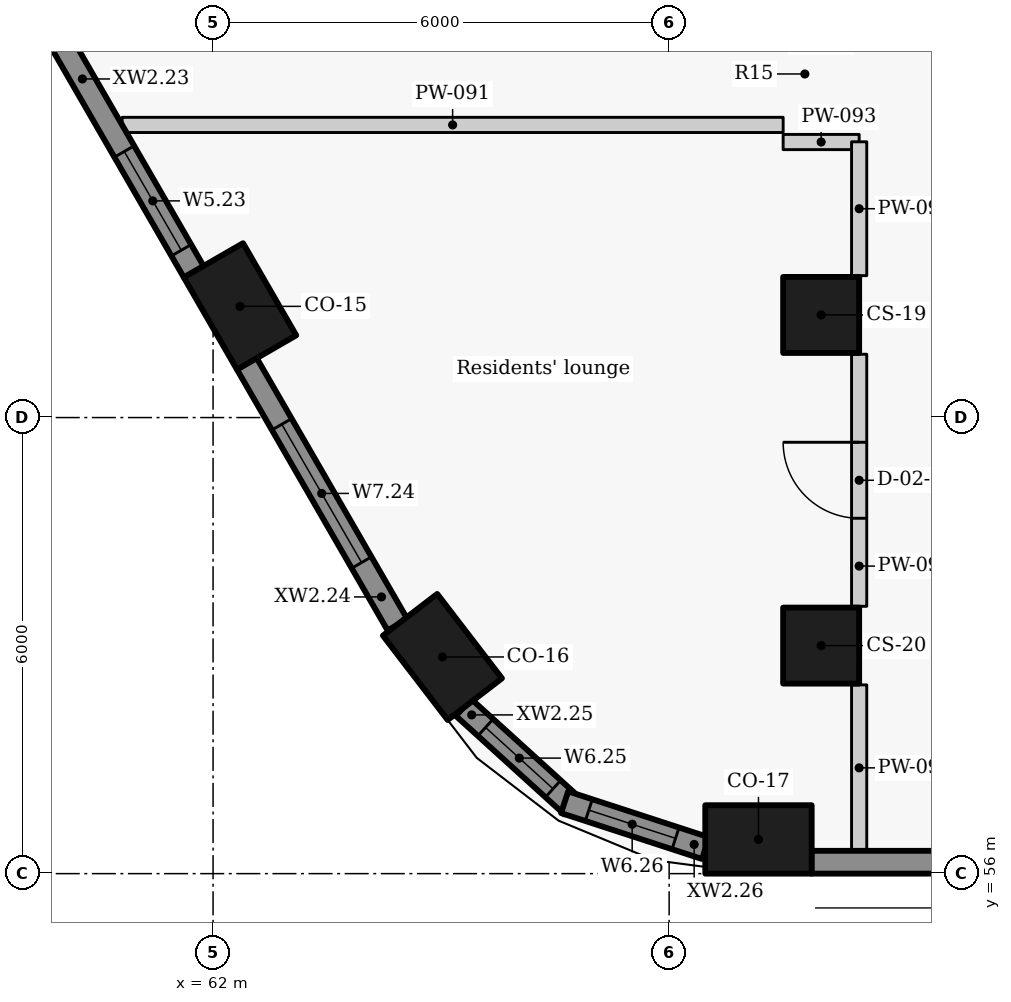
"""IFC4 building model, lengths in metres.
Left out: names, types, materials, properties, quantities, classifications, styles, units other than length and angle.
Written with IfcOpenShell. Run it as: python <this file> out.ifc"""

import sys

from ifc_helpers import new_model, si_unit, direction, frame, frame_2d, origin, origin_2d, place, context, subcontext, project, spatial, rectangle, extrude, element, fill, save


model = new_model("IFC4")
c1 = context("Model", 3, precision=1e-05, world=origin(), true_north=direction((0.0, 1.0)))
c2 = subcontext(c1, "Body", "Model", "MODEL_VIEW")
j1 = project(units=[si_unit("LENGTHUNIT", "METRE"), si_unit("PLANEANGLEUNIT", "RADIAN")], contexts=[c1])
p1 = place(None, origin())
s1 = spatial("IfcSite", under=j1, at=p1, CompositionType="ELEMENT")
p2 = place(p1, origin())
s2 = spatial("IfcBuilding", under=s1, at=p2, CompositionType="ELEMENT")
p3 = place(p2, frame((0.0, 0.0, 81.0)))
s3 = spatial("IfcBuildingStorey", under=s2, at=p3, CompositionType="ELEMENT", Elevation=81.0)
for number, where, z_axis, x_axis in (
    (1, (62.354, 63.463, 0.0), (0.0, 0.0, 1.0), (0.5, -0.866, 0.0)),
    (2, (65.018, 58.851, 0.0), (0.0, 0.0, 1.0), (0.609, -0.793, 0.0)),
    (3, (69.175, 56.45, 0.0), (0.0, 0.0, 1.0), (1.0, 0.0, 0.0)),
):
    element("IfcColumn", number, at=place(p3, frame(where, z_axis=z_axis, x_axis=x_axis)), inside=s3, PredefinedType="COLUMN", context=c2, shape_type="SweptSolid", body=[
        extrude(rectangle(XDim=1.4, YDim=0.9, at=origin_2d()), origin(), (0.0, 0.0, 1.0), 3.3),
    ])
for number, where, z_axis, x_axis in (
    (4, (70.0, 63.35, 0.0), (0.0, 0.0, 1.0), (0.0, -1.0, 0.0)),
    (5, (70.0, 59.0, 0.0), (0.0, 0.0, 1.0), (0.0, -1.0, 0.0)),
):
    element("IfcColumn", number, at=place(p3, frame(where, z_axis=z_axis, x_axis=x_axis)), inside=s3, PredefinedType="COLUMN", context=c2, shape_type="SweptSolid", body=[
        extrude(rectangle(XDim=1.0, YDim=1.0, at=origin_2d()), origin(), (0.0, 0.0, 1.0), 3.3),
    ])
p4 = place(p3, frame((59.78, 67.323, 0.0), z_axis=(0.0, 0.0, 1.0), x_axis=(0.499957037901, -0.866050206543, 0.0)))
e6 = element("IfcWall", 6, at=p4, inside=s3, PredefinedType="SOLIDWALL", context=c2, shape_type="SweptSolid", body=[
    extrude(rectangle(XDim=3.934, YDim=0.3, at=frame_2d((1.967, 0.0))), origin(), (0.0, 0.0, 1.0), 2.425),
])
p5 = place(p4, frame((2.104, 0.0, 0.9)))
e7 = element("IfcOpeningElement", 7, at=p5, cuts=e6, PredefinedType="OPENING", context=c2, shape_type="SweptSolid", body=[
    extrude(rectangle(XDim=1.5, YDim=1.1, at=frame_2d((0.75, 0.55))), frame((0.0, 0.16, 0.0), z_axis=(0.0, -1.0, 0.0), x_axis=(1.0, 0.0, 0.0)), (0.0, 0.0, 1.0), 0.32),
])
p6 = place(p3, frame((62.443, 62.71, 0.0), z_axis=(0.0, 0.0, 1.0), x_axis=(0.500043828347, -0.866000097998, 0.0)))
e8 = element("IfcWall", 8, at=p6, inside=s3, PredefinedType="SOLIDWALL", context=c2, shape_type="SweptSolid", body=[
    extrude(rectangle(XDim=3.968, YDim=0.3, at=frame_2d((1.984, 0.0))), origin(), (0.0, 0.0, 1.0), 2.425),
])
p7 = place(p6, frame((0.922, 0.0, 0.9)))
e9 = element("IfcOpeningElement", 9, at=p7, cuts=e8, PredefinedType="OPENING", context=c2, shape_type="SweptSolid", body=[
    extrude(rectangle(XDim=2.1, YDim=1.1, at=frame_2d((1.05, 0.55))), frame((0.0, 0.16, 0.0), z_axis=(0.0, -1.0, 0.0), x_axis=(1.0, 0.0, 0.0)), (0.0, 0.0, 1.0), 0.32),
])
p8 = place(p3, frame((65.295, 58.186, 0.0), z_axis=(0.0, 0.0, 1.0), x_axis=(0.740421367382, -0.672142989791, 0.0)))
e10 = element("IfcWall", 10, at=p8, inside=s3, PredefinedType="SOLIDWALL", context=c2, shape_type="SweptSolid", body=[
    extrude(rectangle(XDim=1.927, YDim=0.3, at=frame_2d((0.964, 0.0))), origin(), (0.0, 0.0, 1.0), 2.425),
])
p9 = place(p8, frame((0.391, 0.0, 0.9)))
e11 = element("IfcOpeningElement", 11, at=p9, cuts=e10, PredefinedType="OPENING", context=c2, shape_type="SweptSolid", body=[
    extrude(rectangle(XDim=1.2, YDim=1.1, at=frame_2d((0.6, 0.55))), frame((0.0, 0.16, 0.0), z_axis=(0.0, -1.0, 0.0), x_axis=(1.0, 0.0, 0.0)), (0.0, 0.0, 1.0), 0.32),
])
p10 = place(p3, frame((66.625, 56.939, 0.0), z_axis=(0.0, 0.0, 1.0), x_axis=(0.950777961763, -0.309872985958, 0.0)))
e12 = element("IfcWall", 12, at=p10, inside=s3, PredefinedType="SOLIDWALL", context=c2, shape_type="SweptSolid", body=[
    extrude(rectangle(XDim=1.95, YDim=0.3, at=frame_2d((0.975, 0.0))), origin(), (0.0, 0.0, 1.0), 2.425),
])
p11 = place(p10, frame((0.335, 0.0, 0.9)))
e13 = element("IfcOpeningElement", 13, at=p11, cuts=e12, PredefinedType="OPENING", context=c2, shape_type="SweptSolid", body=[
    extrude(rectangle(XDim=1.2, YDim=1.1, at=frame_2d((0.6, 0.55))), frame((0.0, 0.16, 0.0), z_axis=(0.0, -1.0, 0.0), x_axis=(1.0, 0.0, 0.0)), (0.0, 0.0, 1.0), 0.32),
])
p12 = place(p3, frame((69.871, 56.15, 0.0), z_axis=(0.0, 0.0, 1.0), x_axis=(1.0, 0.0, 0.0)))
e14 = element("IfcWall", 14, at=p12, inside=s3, PredefinedType="SOLIDWALL", context=c2, shape_type="SweptSolid", body=[
    extrude(rectangle(XDim=19.94, YDim=0.3, at=frame_2d((9.97, 0.0))), origin(), (0.0, 0.0, 1.0), 2.425),
])
p13 = place(p3, frame((60.803, 65.85, 0.0), z_axis=(0.0, 0.0, 1.0), x_axis=(1.0, 0.0, 0.0)))
e15 = element("IfcWall", 15, at=p13, inside=s3, PredefinedType="PARTITIONING", context=c2, shape_type="SweptSolid", body=[
    extrude(rectangle(XDim=8.697, YDim=0.2, at=frame_2d((4.349, 0.0))), origin(), (0.0, 0.0, 1.0), 2.405),
])
p14 = place(p3, frame((69.5, 65.625, 0.0), z_axis=(0.0, 0.0, 1.0), x_axis=(1.0, 0.0, 0.0)))
e16 = element("IfcWall", 16, at=p14, inside=s3, PredefinedType="PARTITIONING", context=c2, shape_type="SweptSolid", body=[
    extrude(rectangle(XDim=1.0, YDim=0.2, at=frame_2d((0.5, 0.0))), origin(), (0.0, 0.0, 1.0), 2.505),
])
p15 = place(p3, frame((70.5, 56.3, 0.0), z_axis=(0.0, 0.0, 1.0), x_axis=(0.0, 1.0, 0.0)))
e17 = element("IfcWall", 17, at=p15, inside=s3, PredefinedType="PARTITIONING", context=c2, shape_type="SweptSolid", body=[
    extrude(rectangle(XDim=2.183, YDim=0.2, at=frame_2d((1.091, 0.0))), origin(), (0.0, 0.0, 1.0), 3.025),
])
p16 = place(p3, frame((70.5, 59.517, 0.0), z_axis=(0.0, 0.0, 1.0), x_axis=(0.0, 1.0, 0.0)))
e18 = element("IfcWall", 18, at=p16, inside=s3, PredefinedType="PARTITIONING", context=c2, shape_type="SweptSolid", body=[
    extrude(rectangle(XDim=3.316, YDim=0.2, at=frame_2d((1.658, 0.0))), origin(), (0.0, 0.0, 1.0), 3.025),
])
p17 = place(p16, frame((1.158, 0.0, 0.0)))
e19 = element("IfcOpeningElement", 19, at=p17, cuts=e18, PredefinedType="OPENING", context=c2, shape_type="SweptSolid", body=[
    extrude(rectangle(XDim=1.0, YDim=2.1, at=frame_2d((0.5, 1.05))), frame((0.0, 0.11, 0.0), z_axis=(0.0, -1.0, 0.0), x_axis=(1.0, 0.0, 0.0)), (0.0, 0.0, 1.0), 0.22),
])
p18 = place(p3, frame((70.5, 63.867, 0.0), z_axis=(0.0, 0.0, 1.0), x_axis=(0.0, 1.0, 0.0)))
e20 = element("IfcWall", 20, at=p18, inside=s3, PredefinedType="PARTITIONING", context=c2, shape_type="SweptSolid", body=[
    extrude(rectangle(XDim=1.761, YDim=0.2, at=frame_2d((0.88, 0.0))), origin(), (0.0, 0.0, 1.0), 3.025),
])
p19 = place(p5, origin())
e21 = element("IfcWindow", 21, at=p19, inside=s3, PartitioningType="SINGLE_PANEL", PredefinedType="WINDOW", context=c2, shape_type="SweptSolid", body=[
    extrude(rectangle(XDim=1.5, YDim=1.1, at=frame_2d((0.75, 0.55))), frame((0.0, 0.03, 0.0), z_axis=(0.0, -1.0, 0.0), x_axis=(1.0, 0.0, 0.0)), (0.0, 0.0, 1.0), 0.06),
])
fill(e7, e21)
p20 = place(p7, origin())
e22 = element("IfcWindow", 22, at=p20, inside=s3, PartitioningType="SINGLE_PANEL", PredefinedType="WINDOW", context=c2, shape_type="SweptSolid", body=[
    extrude(rectangle(XDim=2.1, YDim=1.1, at=frame_2d((1.05, 0.55))), frame((0.0, 0.03, 0.0), z_axis=(0.0, -1.0, 0.0), x_axis=(1.0, 0.0, 0.0)), (0.0, 0.0, 1.0), 0.06),
])
fill(e9, e22)
p21 = place(p9, origin())
e23 = element("IfcWindow", 23, at=p21, inside=s3, PartitioningType="SINGLE_PANEL", PredefinedType="WINDOW", context=c2, shape_type="SweptSolid", body=[
    extrude(rectangle(XDim=1.2, YDim=1.1, at=frame_2d((0.6, 0.55))), frame((0.0, 0.03, 0.0), z_axis=(0.0, -1.0, 0.0), x_axis=(1.0, 0.0, 0.0)), (0.0, 0.0, 1.0), 0.06),
])
fill(e11, e23)
p22 = place(p11, origin())
e24 = element("IfcWindow", 24, at=p22, inside=s3, PartitioningType="SINGLE_PANEL", PredefinedType="WINDOW", context=c2, shape_type="SweptSolid", body=[
    extrude(rectangle(XDim=1.2, YDim=1.1, at=frame_2d((0.6, 0.55))), frame((0.0, 0.03, 0.0), z_axis=(0.0, -1.0, 0.0), x_axis=(1.0, 0.0, 0.0)), (0.0, 0.0, 1.0), 0.06),
])
fill(e13, e24)
p23 = place(p17, origin())
e25 = element("IfcDoor", 25, at=p23, inside=s3, OperationType="SINGLE_SWING_RIGHT", PredefinedType="DOOR", context=c2, shape_type="SweptSolid", body=[
    extrude(rectangle(XDim=1.0, YDim=2.1, at=frame_2d((0.5, 1.05))), frame((0.0, 0.025, 0.0), z_axis=(0.0, -1.0, 0.0), x_axis=(1.0, 0.0, 0.0)), (0.0, 0.0, 1.0), 0.05),
])
fill(e19, e25)
save(model, sys.argv[1])
